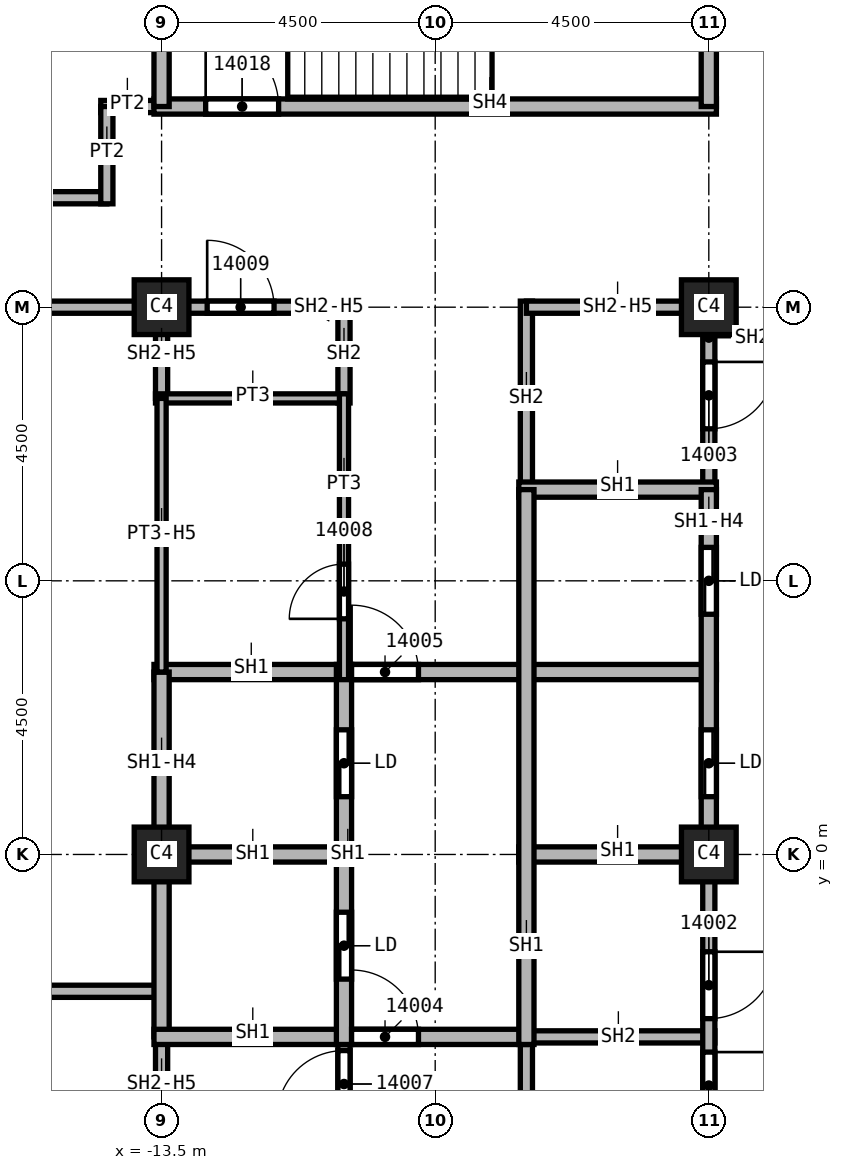
"""IFC4 building model, lengths in metres.
Left out: names, types, materials, properties, quantities, classifications, styles, units other than length and angle.
Written with IfcOpenShell. Run it as: python <this file> out.ifc"""

import sys

from ifc_helpers import new_model, si_unit, direction, frame, frame_2d, origin, origin_2d, place, context, subcontext, project, spatial, rectangle, extrude, element, fill, save


model = new_model("IFC4")
c1 = context("Model", 3, precision=1e-05, world=origin(), true_north=direction((0.0, 1.0)))
c2 = subcontext(c1, "Body", "Model", "MODEL_VIEW")
j1 = project(units=[si_unit("LENGTHUNIT", "METRE"), si_unit("PLANEANGLEUNIT", "RADIAN")], contexts=[c1])
p1 = place(None, origin())
s1 = spatial("IfcSite", under=j1, at=p1, CompositionType="ELEMENT")
p2 = place(p1, origin())
s2 = spatial("IfcBuilding", under=s1, at=p2, CompositionType="ELEMENT")
p3 = place(p2, frame((0.0, 0.0, 220.0)))
s3 = spatial("IfcBuildingStorey", under=s2, at=p3, CompositionType="ELEMENT", Elevation=220.0)
for number, where, z_axis, x_axis in (
    (1, (-4.5, 0.0, 0.0), (0.0, 0.0, 1.0), (1.0, 0.0, 0.0)),
    (2, (-4.5, 9.0, 0.0), (0.0, 0.0, 1.0), (1.0, 0.0, 0.0)),
    (3, (-13.5, 0.0, 0.0), (0.0, 0.0, 1.0), (1.0, 0.0, 0.0)),
    (4, (-13.5, 9.0, 0.0), (0.0, 0.0, 1.0), (1.0, 0.0, 0.0)),
):
    element("IfcColumn", number, at=place(p3, frame(where, z_axis=z_axis, x_axis=x_axis)), inside=s3, PredefinedType="COLUMN", context=c2, shape_type="SweptSolid", body=[
        extrude(rectangle(XDim=0.9, YDim=0.9, at=origin_2d()), origin(), (0.0, 0.0, 1.0), 3.72),
    ])
p4 = place(p3, frame((-18.0, -2.25, 0.0), z_axis=(0.0, 0.0, 1.0), x_axis=(1.0, 0.0, 0.0)))
e5 = element("IfcWall", 5, at=p4, inside=s3, PredefinedType="PARTITIONING", context=c2, shape_type="SweptSolid", body=[
    extrude(rectangle(XDim=4.5, YDim=0.2, at=frame_2d((2.25, 0.0))), origin(), (0.0, 0.0, 1.0), 3.72),
])
p5 = place(p3, frame((-18.0, 10.8, 0.0), z_axis=(0.0, 0.0, 1.0), x_axis=(1.0, 0.0, 0.0)))
e6 = element("IfcWall", 6, at=p5, inside=s3, PredefinedType="PARTITIONING", context=c2, shape_type="SweptSolid", body=[
    extrude(rectangle(XDim=3.6, YDim=0.2, at=frame_2d((1.8, 0.0))), origin(), (0.0, 0.0, 1.0), 3.72),
])
p6 = place(p5, frame((0.25, 0.0, 0.0)))
e7 = element("IfcOpeningElement", 7, at=p6, cuts=e6, PredefinedType="OPENING", context=c2, shape_type="SweptSolid", body=[
    extrude(rectangle(XDim=1.0, YDim=2.1, at=frame_2d((0.5, 1.05))), frame((0.0, 0.1, 0.0), z_axis=(0.0, -1.0, 0.0), x_axis=(1.0, 0.0, 0.0)), (0.0, 0.0, 1.0), 0.2),
])
p7 = place(p3, frame((-14.5, 12.3, 0.0), z_axis=(0.0, 0.0, 1.0), x_axis=(1.0, 0.0, 0.0)))
e8 = element("IfcWall", 8, at=p7, inside=s3, PredefinedType="PARTITIONING", context=c2, shape_type="SweptSolid", body=[
    extrude(rectangle(XDim=1.125, YDim=0.2, at=frame_2d((0.562, 0.0))), origin(), (0.0, 0.0, 1.0), 3.72),
])
p8 = place(p3, frame((-13.5, 9.0, 0.0), z_axis=(0.0, 0.0, 1.0), x_axis=(-1.0, 0.0, 0.0)))
e9 = element("IfcWall", 9, at=p8, inside=s3, PredefinedType="PARTITIONING", context=c2, shape_type="SweptSolid", body=[
    extrude(rectangle(XDim=4.5, YDim=0.2, at=frame_2d((2.25, 0.0))), origin(), (0.0, 0.0, 1.0), 3.72),
])
p9 = place(p3, frame((-14.4, 10.7, 0.0), z_axis=(0.0, 0.0, 1.0), x_axis=(0.0, 1.0, 0.0)))
e10 = element("IfcWall", 10, at=p9, inside=s3, PredefinedType="PARTITIONING", context=c2, shape_type="SweptSolid", body=[
    extrude(rectangle(XDim=1.6, YDim=0.2, at=frame_2d((0.8, 0.0))), origin(), (0.0, 0.0, 1.0), 3.72),
])
p10 = place(p3, frame((-13.6, 9.0, 0.0), z_axis=(0.0, 0.0, 1.0), x_axis=(1.0, 0.0, 0.0)))
e11 = element("IfcWall", 11, at=p10, inside=s3, PredefinedType="SOLIDWALL", context=c2, shape_type="SweptSolid", body=[
    extrude(rectangle(XDim=3.1, YDim=0.2, at=frame_2d((1.55, 0.0))), origin(), (0.0, 0.0, 1.0), 2.958),
])
p11 = place(p10, frame((0.85, 0.0, 0.0)))
e12 = element("IfcOpeningElement", 12, at=p11, cuts=e11, PredefinedType="OPENING", context=c2, shape_type="SweptSolid", body=[
    extrude(rectangle(XDim=1.1, YDim=2.1, at=frame_2d((0.55, 1.05))), frame((0.0, 0.1, 0.0), z_axis=(0.0, -1.0, 0.0), x_axis=(1.0, 0.0, 0.0)), (0.0, 0.0, 1.0), 0.2),
])
p12 = place(p3, frame((-13.5, -4.5, 0.0), z_axis=(0.0, 0.0, 1.0), x_axis=(0.0, 1.0, 0.0)))
e13 = element("IfcWall", 13, at=p12, inside=s3, PredefinedType="SOLIDWALL", context=c2, shape_type="SweptSolid", body=[
    extrude(rectangle(XDim=1.5, YDim=0.2, at=frame_2d((0.75, 0.0))), origin(), (0.0, 0.0, 1.0), 2.958),
])
p13 = place(p3, frame((-13.5, 7.5, 0.0), z_axis=(0.0, 0.0, 1.0), x_axis=(0.0, 1.0, 0.0)))
e14 = element("IfcWall", 14, at=p13, inside=s3, PredefinedType="SOLIDWALL", context=c2, shape_type="SweptSolid", body=[
    extrude(rectangle(XDim=1.6, YDim=0.2, at=frame_2d((0.8, 0.0))), origin(), (0.0, 0.0, 1.0), 2.958),
])
p14 = place(p3, frame((-10.5, -4.575, 0.0), z_axis=(0.0, 0.0, 1.0), x_axis=(0.0, 1.0, 0.0)))
e15 = element("IfcWall", 15, at=p14, inside=s3, PredefinedType="SOLIDWALL", context=c2, shape_type="SweptSolid", body=[
    extrude(rectangle(XDim=1.7, YDim=0.2, at=frame_2d((0.85, 0.0))), origin(), (0.0, 0.0, 1.0), 3.72),
])
p15 = place(p14, frame((0.25, 0.0, 0.0)))
e16 = element("IfcOpeningElement", 16, at=p15, cuts=e15, PredefinedType="OPENING", context=c2, shape_type="SweptSolid", body=[
    extrude(rectangle(XDim=1.1, YDim=2.1, at=frame_2d((0.55, 1.05))), frame((0.0, 0.1, 0.0), z_axis=(0.0, -1.0, 0.0), x_axis=(1.0, 0.0, 0.0)), (0.0, 0.0, 1.0), 0.2),
])
p16 = place(p3, frame((-10.5, 7.425, 0.0), z_axis=(0.0, 0.0, 1.0), x_axis=(0.0, 1.0, 0.0)))
e17 = element("IfcWall", 17, at=p16, inside=s3, PredefinedType="SOLIDWALL", context=c2, shape_type="SweptSolid", body=[
    extrude(rectangle(XDim=1.675, YDim=0.2, at=frame_2d((0.837, 0.0))), origin(), (0.0, 0.0, 1.0), 3.72),
])
p17 = place(p3, frame((-7.625, -3.0, 0.0), z_axis=(0.0, 0.0, 1.0), x_axis=(1.0, 0.0, 0.0)))
e18 = element("IfcWall", 18, at=p17, inside=s3, PredefinedType="SOLIDWALL", context=c2, shape_type="SweptSolid", body=[
    extrude(rectangle(XDim=3.225, YDim=0.2, at=frame_2d((1.613, 0.0))), origin(), (0.0, 0.0, 1.0), 3.72),
])
p18 = place(p3, frame((-7.5, -9.1, 0.0), z_axis=(0.0, 0.0, 1.0), x_axis=(0.0, 1.0, 0.0)))
e19 = element("IfcWall", 19, at=p18, inside=s3, PredefinedType="SOLIDWALL", context=c2, shape_type="SweptSolid", body=[
    extrude(rectangle(XDim=6.225, YDim=0.2, at=frame_2d((3.113, 0.0))), origin(), (0.0, 0.0, 1.0), 3.72),
])
p19 = place(p3, frame((-7.5, 6.0, 0.0), z_axis=(0.0, 0.0, 1.0), x_axis=(0.0, 1.0, 0.0)))
e20 = element("IfcWall", 20, at=p19, inside=s3, PredefinedType="SOLIDWALL", context=c2, shape_type="SweptSolid", body=[
    extrude(rectangle(XDim=3.1, YDim=0.2, at=frame_2d((1.55, 0.0))), origin(), (0.0, 0.0, 1.0), 3.72),
])
p20 = place(p3, frame((-7.5, 9.0, 0.0), z_axis=(0.0, 0.0, 1.0), x_axis=(1.0, 0.0, 0.0)))
e21 = element("IfcWall", 21, at=p20, inside=s3, PredefinedType="SOLIDWALL", context=c2, shape_type="SweptSolid", body=[
    extrude(rectangle(XDim=3.0, YDim=0.2, at=frame_2d((1.5, 0.0))), origin(), (0.0, 0.0, 1.0), 2.958),
])
p21 = place(p3, frame((-4.5, 0.0, 0.0), z_axis=(0.0, 0.0, 1.0), x_axis=(0.0, -1.0, 0.0)))
e22 = element("IfcWall", 22, at=p21, inside=s3, PredefinedType="SOLIDWALL", context=c2, shape_type="SweptSolid", body=[
    extrude(rectangle(XDim=9.1, YDim=0.2, at=frame_2d((4.55, 0.0))), origin(), (0.0, 0.0, 1.0), 2.958),
])
p22 = place(p21, frame((3.25, 0.0, 0.0)))
e23 = element("IfcOpeningElement", 23, at=p22, cuts=e22, PredefinedType="OPENING", context=c2, shape_type="SweptSolid", body=[
    extrude(rectangle(XDim=1.1, YDim=2.1, at=frame_2d((0.55, 1.05))), frame((0.0, 0.1, 0.0), z_axis=(0.0, -1.0, 0.0), x_axis=(1.0, 0.0, 0.0)), (0.0, 0.0, 1.0), 0.2),
])
p23 = place(p21, frame((1.6, 0.0, 0.0)))
e24 = element("IfcOpeningElement", 24, at=p23, cuts=e22, PredefinedType="OPENING", context=c2, shape_type="SweptSolid", body=[
    extrude(rectangle(XDim=1.1, YDim=2.1, at=frame_2d((0.55, 1.05))), frame((0.0, 0.1, 0.0), z_axis=(0.0, -1.0, 0.0), x_axis=(1.0, 0.0, 0.0)), (0.0, 0.0, 1.0), 0.2),
])
p24 = place(p3, frame((-4.5, 9.1, 0.0), z_axis=(0.0, 0.0, 1.0), x_axis=(0.0, -1.0, 0.0)))
e25 = element("IfcWall", 25, at=p24, inside=s3, PredefinedType="SOLIDWALL", context=c2, shape_type="SweptSolid", body=[
    extrude(rectangle(XDim=3.1, YDim=0.2, at=frame_2d((1.55, 0.0))), origin(), (0.0, 0.0, 1.0), 2.958),
])
p25 = place(p24, frame((1.0, 0.0, 0.0)))
e26 = element("IfcOpeningElement", 26, at=p25, cuts=e25, PredefinedType="OPENING", context=c2, shape_type="SweptSolid", body=[
    extrude(rectangle(XDim=1.1, YDim=2.1, at=frame_2d((0.55, 1.05))), frame((0.0, 0.1, 0.0), z_axis=(0.0, -1.0, 0.0), x_axis=(1.0, 0.0, 0.0)), (0.0, 0.0, 1.0), 0.2),
])
p26 = place(p3, frame((-13.625, 0.0, 0.0), z_axis=(0.0, 0.0, 1.0), x_axis=(1.0, 0.0, 0.0)))
e27 = element("IfcWall", 27, at=p26, inside=s3, PredefinedType="SOLIDWALL", context=c2, shape_type="SweptSolid", body=[
    extrude(rectangle(XDim=3.125, YDim=0.25, at=frame_2d((1.562, 0.0))), origin(), (0.0, 0.0, 1.0), 3.72),
])
p27 = place(p3, frame((-13.625, 3.0, 0.0), z_axis=(0.0, 0.0, 1.0), x_axis=(1.0, 0.0, 0.0)))
e28 = element("IfcWall", 28, at=p27, inside=s3, PredefinedType="SOLIDWALL", context=c2, shape_type="SweptSolid", body=[
    extrude(rectangle(XDim=9.25, YDim=0.25, at=frame_2d((4.625, 0.0))), origin(), (0.0, 0.0, 1.0), 3.72),
])
p28 = place(p27, frame((3.25, 0.0, 0.0)))
e29 = element("IfcOpeningElement", 29, at=p28, cuts=e28, PredefinedType="OPENING", context=c2, shape_type="SweptSolid", body=[
    extrude(rectangle(XDim=1.1, YDim=2.1, at=frame_2d((0.55, 1.05))), frame((0.0, 0.125, 0.0), z_axis=(0.0, -1.0, 0.0), x_axis=(1.0, 0.0, 0.0)), (0.0, 0.0, 1.0), 0.25),
])
p29 = place(p3, frame((-13.5, -3.0, 0.0), z_axis=(0.0, 0.0, 1.0), x_axis=(0.0, 1.0, 0.0)))
e30 = element("IfcWall", 30, at=p29, inside=s3, PredefinedType="SOLIDWALL", context=c2, shape_type="SweptSolid", body=[
    extrude(rectangle(XDim=6.0, YDim=0.25, at=frame_2d((3.0, 0.0))), origin(), (0.0, 0.0, 1.0), 2.958),
])
p30 = place(p3, frame((-13.625, -3.0, 0.0), z_axis=(0.0, 0.0, 1.0), x_axis=(1.0, 0.0, 0.0)))
e31 = element("IfcWall", 31, at=p30, inside=s3, PredefinedType="SOLIDWALL", context=c2, shape_type="SweptSolid", body=[
    extrude(rectangle(XDim=6.125, YDim=0.25, at=frame_2d((3.062, 0.0))), origin(), (0.0, 0.0, 1.0), 3.72),
])
p31 = place(p30, frame((3.25, 0.0, 0.0)))
e32 = element("IfcOpeningElement", 32, at=p31, cuts=e31, PredefinedType="OPENING", context=c2, shape_type="SweptSolid", body=[
    extrude(rectangle(XDim=1.1, YDim=2.1, at=frame_2d((0.55, 1.05))), frame((0.0, 0.125, 0.0), z_axis=(0.0, -1.0, 0.0), x_axis=(1.0, 0.0, 0.0)), (0.0, 0.0, 1.0), 0.25),
])
p32 = place(p3, frame((-10.5, -3.125, 0.0), z_axis=(0.0, 0.0, 1.0), x_axis=(0.0, 1.0, 0.0)))
e33 = element("IfcWall", 33, at=p32, inside=s3, PredefinedType="SOLIDWALL", context=c2, shape_type="SweptSolid", body=[
    extrude(rectangle(XDim=6.25, YDim=0.25, at=frame_2d((3.125, 0.0))), origin(), (0.0, 0.0, 1.0), 3.72),
])
p33 = place(p32, frame((1.075, 0.0, 0.0)))
e34 = element("IfcOpeningElement", 34, at=p33, cuts=e33, PredefinedType="OPENING", context=c2, shape_type="SweptSolid", body=[
    extrude(rectangle(XDim=1.1, YDim=2.1, at=frame_2d((0.55, 1.05))), frame((0.0, 0.125, 0.0), z_axis=(0.0, -1.0, 0.0), x_axis=(1.0, 0.0, 0.0)), (0.0, 0.0, 1.0), 0.25),
])
p34 = place(p32, frame((4.075, 0.0, 0.0)))
e35 = element("IfcOpeningElement", 35, at=p34, cuts=e33, PredefinedType="OPENING", context=c2, shape_type="SweptSolid", body=[
    extrude(rectangle(XDim=1.1, YDim=2.1, at=frame_2d((0.55, 1.05))), frame((0.0, 0.125, 0.0), z_axis=(0.0, -1.0, 0.0), x_axis=(1.0, 0.0, 0.0)), (0.0, 0.0, 1.0), 0.25),
])
for number, where, z_axis, x_axis in (
    (36, (-7.625, 0.0, 0.0), (0.0, 0.0, 1.0), (1.0, 0.0, 0.0)),
    (37, (-7.625, 6.0, 0.0), (0.0, 0.0, 1.0), (1.0, 0.0, 0.0)),
):
    element("IfcWall", number, at=place(p3, frame(where, z_axis=z_axis, x_axis=x_axis)), inside=s3, PredefinedType="SOLIDWALL", context=c2, shape_type="SweptSolid", body=[
        extrude(rectangle(XDim=3.25, YDim=0.25, at=frame_2d((1.625, 0.0))), origin(), (0.0, 0.0, 1.0), 3.72),
    ])
p35 = place(p3, frame((-7.5, -3.125, 0.0), z_axis=(0.0, 0.0, 1.0), x_axis=(0.0, 1.0, 0.0)))
e38 = element("IfcWall", 38, at=p35, inside=s3, PredefinedType="SOLIDWALL", context=c2, shape_type="SweptSolid", body=[
    extrude(rectangle(XDim=9.125, YDim=0.25, at=frame_2d((4.562, 0.0))), origin(), (0.0, 0.0, 1.0), 3.72),
])
p36 = place(p3, frame((-4.5, 6.0, 0.0), z_axis=(0.0, 0.0, 1.0), x_axis=(0.0, -1.0, 0.0)))
e39 = element("IfcWall", 39, at=p36, inside=s3, PredefinedType="SOLIDWALL", context=c2, shape_type="SweptSolid", body=[
    extrude(rectangle(XDim=6.0, YDim=0.25, at=frame_2d((3.0, 0.0))), origin(), (0.0, 0.0, 1.0), 2.958),
])
p37 = place(p36, frame((3.95, 0.0, 0.0)))
e40 = element("IfcOpeningElement", 40, at=p37, cuts=e39, PredefinedType="OPENING", context=c2, shape_type="SweptSolid", body=[
    extrude(rectangle(XDim=1.1, YDim=2.1, at=frame_2d((0.55, 1.05))), frame((0.0, 0.125, 0.0), z_axis=(0.0, -1.0, 0.0), x_axis=(1.0, 0.0, 0.0)), (0.0, 0.0, 1.0), 0.25),
])
p38 = place(p36, frame((0.95, 0.0, 0.0)))
e41 = element("IfcOpeningElement", 41, at=p38, cuts=e39, PredefinedType="OPENING", context=c2, shape_type="SweptSolid", body=[
    extrude(rectangle(XDim=1.1, YDim=2.1, at=frame_2d((0.55, 1.05))), frame((0.0, 0.125, 0.0), z_axis=(0.0, -1.0, 0.0), x_axis=(1.0, 0.0, 0.0)), (0.0, 0.0, 1.0), 0.25),
])
p39 = place(p3, frame((-13.625, 12.3, 0.0), z_axis=(0.0, 0.0, 1.0), x_axis=(1.0, 0.0, 0.0)))
e42 = element("IfcWall", 42, at=p39, inside=s3, PredefinedType="SOLIDWALL", context=c2, shape_type="SweptSolid", body=[
    extrude(rectangle(XDim=9.25, YDim=0.25, at=frame_2d((4.625, 0.0))), origin(), (0.0, 0.0, 1.0), 3.72),
])
p40 = place(p39, frame((0.85, 0.0, 0.0)))
e43 = element("IfcOpeningElement", 43, at=p40, cuts=e42, PredefinedType="OPENING", context=c2, shape_type="SweptSolid", body=[
    extrude(rectangle(XDim=1.2, YDim=2.1, at=frame_2d((0.6, 1.05))), frame((0.0, 0.125, 0.0), z_axis=(0.0, -1.0, 0.0), x_axis=(1.0, 0.0, 0.0)), (0.0, 0.0, 1.0), 0.25),
])
for number, where, z_axis, x_axis in (
    (44, (-13.5, 12.3, 0.0), (0.0, 0.0, 1.0), (0.0, 1.0, 0.0)),
    (45, (-4.5, 16.8, 0.0), (0.0, 0.0, 1.0), (0.0, -1.0, 0.0)),
):
    element("IfcWall", number, at=place(p3, frame(where, z_axis=z_axis, x_axis=x_axis)), inside=s3, PredefinedType="SOLIDWALL", context=c2, shape_type="SweptSolid", body=[
        extrude(rectangle(XDim=4.5, YDim=0.25, at=frame_2d((2.25, 0.0))), origin(), (0.0, 0.0, 1.0), 3.72),
    ])
p41 = place(p3, frame((-13.6, 7.5, 0.0), z_axis=(0.0, 0.0, 1.0), x_axis=(1.0, 0.0, 0.0)))
e46 = element("IfcWall", 46, at=p41, inside=s3, PredefinedType="PARTITIONING", context=c2, shape_type="SweptSolid", body=[
    extrude(rectangle(XDim=3.1, YDim=0.15, at=frame_2d((1.55, 0.0))), origin(), (0.0, 0.0, 1.0), 3.72),
])
p42 = place(p3, frame((-13.5, 3.0, 0.0), z_axis=(0.0, 0.0, 1.0), x_axis=(0.0, 1.0, 0.0)))
e47 = element("IfcWall", 47, at=p42, inside=s3, PredefinedType="PARTITIONING", context=c2, shape_type="SweptSolid", body=[
    extrude(rectangle(XDim=4.5, YDim=0.15, at=frame_2d((2.25, 0.0))), origin(), (0.0, 0.0, 1.0), 2.958),
])
p43 = place(p3, frame((-10.5, 2.875, 0.0), z_axis=(0.0, 0.0, 1.0), x_axis=(0.0, 1.0, 0.0)))
e48 = element("IfcWall", 48, at=p43, inside=s3, PredefinedType="PARTITIONING", context=c2, shape_type="SweptSolid", body=[
    extrude(rectangle(XDim=4.7, YDim=0.15, at=frame_2d((2.35, 0.0))), origin(), (0.0, 0.0, 1.0), 3.72),
])
p44 = place(p43, frame((1.0, 0.0, 0.0)))
e49 = element("IfcOpeningElement", 49, at=p44, cuts=e48, PredefinedType="OPENING", context=c2, shape_type="SweptSolid", body=[
    extrude(rectangle(XDim=0.9, YDim=2.1, at=frame_2d((0.45, 1.05))), frame((0.0, 0.075, 0.0), z_axis=(0.0, -1.0, 0.0), x_axis=(1.0, 0.0, 0.0)), (0.0, 0.0, 1.0), 0.15),
])
p45 = place(p22, origin())
e50 = element("IfcDoor", 50, at=p45, inside=s3, OperationType="SINGLE_SWING_RIGHT", PredefinedType="DOOR", context=c2, shape_type="SweptSolid", body=[
    extrude(rectangle(XDim=1.1, YDim=2.1, at=frame_2d((0.55, 1.05))), frame((0.0, 0.025, 0.0), z_axis=(0.0, -1.0, 0.0), x_axis=(1.0, 0.0, 0.0)), (0.0, 0.0, 1.0), 0.05),
])
fill(e23, e50)
p46 = place(p23, origin())
e51 = element("IfcDoor", 51, at=p46, inside=s3, OperationType="SINGLE_SWING_LEFT", PredefinedType="DOOR", context=c2, shape_type="SweptSolid", body=[
    extrude(rectangle(XDim=1.1, YDim=2.1, at=frame_2d((0.55, 1.05))), frame((0.0, 0.025, 0.0), z_axis=(0.0, -1.0, 0.0), x_axis=(1.0, 0.0, 0.0)), (0.0, 0.0, 1.0), 0.05),
])
fill(e24, e51)
p47 = place(p25, origin())
e52 = element("IfcDoor", 52, at=p47, inside=s3, OperationType="SINGLE_SWING_RIGHT", PredefinedType="DOOR", context=c2, shape_type="SweptSolid", body=[
    extrude(rectangle(XDim=1.1, YDim=2.1, at=frame_2d((0.55, 1.05))), frame((0.0, 0.025, 0.0), z_axis=(0.0, -1.0, 0.0), x_axis=(1.0, 0.0, 0.0)), (0.0, 0.0, 1.0), 0.05),
])
fill(e26, e52)
p48 = place(p31, origin())
e53 = element("IfcDoor", 53, at=p48, inside=s3, OperationType="SINGLE_SWING_LEFT", PredefinedType="DOOR", context=c2, shape_type="SweptSolid", body=[
    extrude(rectangle(XDim=1.1, YDim=2.1, at=frame_2d((0.55, 1.05))), frame((0.0, 0.025, 0.0), z_axis=(0.0, -1.0, 0.0), x_axis=(1.0, 0.0, 0.0)), (0.0, 0.0, 1.0), 0.05),
])
fill(e32, e53)
p49 = place(p28, origin())
e54 = element("IfcDoor", 54, at=p49, inside=s3, OperationType="SINGLE_SWING_RIGHT", PredefinedType="DOOR", context=c2, shape_type="SweptSolid", body=[
    extrude(rectangle(XDim=1.1, YDim=2.1, at=frame_2d((0.55, 1.05))), frame((0.0, 0.025, 0.0), z_axis=(0.0, -1.0, 0.0), x_axis=(1.0, 0.0, 0.0)), (0.0, 0.0, 1.0), 0.05),
])
fill(e29, e54)
p50 = place(p15, origin())
e55 = element("IfcDoor", 55, at=p50, inside=s3, OperationType="SINGLE_SWING_RIGHT", PredefinedType="DOOR", context=c2, shape_type="SweptSolid", body=[
    extrude(rectangle(XDim=1.1, YDim=2.1, at=frame_2d((0.55, 1.05))), frame((0.0, 0.025, 0.0), z_axis=(0.0, -1.0, 0.0), x_axis=(1.0, 0.0, 0.0)), (0.0, 0.0, 1.0), 0.05),
])
fill(e16, e55)
p51 = place(p44, origin())
e56 = element("IfcDoor", 56, at=p51, inside=s3, OperationType="SINGLE_SWING_LEFT", PredefinedType="DOOR", context=c2, shape_type="SweptSolid", body=[
    extrude(rectangle(XDim=0.9, YDim=2.1, at=frame_2d((0.45, 1.05))), frame((0.0, 0.025, 0.0), z_axis=(0.0, -1.0, 0.0), x_axis=(1.0, 0.0, 0.0)), (0.0, 0.0, 1.0), 0.05),
])
fill(e49, e56)
p52 = place(p11, origin())
e57 = element("IfcDoor", 57, at=p52, inside=s3, OperationType="SINGLE_SWING_RIGHT", PredefinedType="DOOR", context=c2, shape_type="SweptSolid", body=[
    extrude(rectangle(XDim=1.1, YDim=2.1, at=frame_2d((0.55, 1.05))), frame((0.0, 0.025, 0.0), z_axis=(0.0, -1.0, 0.0), x_axis=(1.0, 0.0, 0.0)), (0.0, 0.0, 1.0), 0.05),
])
fill(e12, e57)
p53 = place(p40, origin())
e58 = element("IfcDoor", 58, at=p53, inside=s3, OperationType="SINGLE_SWING_LEFT", PredefinedType="DOOR", context=c2, shape_type="SweptSolid", body=[
    extrude(rectangle(XDim=1.2, YDim=2.1, at=frame_2d((0.6, 1.05))), frame((0.0, 0.025, 0.0), z_axis=(0.0, -1.0, 0.0), x_axis=(1.0, 0.0, 0.0)), (0.0, 0.0, 1.0), 0.05),
])
fill(e43, e58)
p54 = place(p37, origin())
e59 = element("IfcDoor", 59, at=p54, inside=s3, OperationType="SLIDING_TO_LEFT", PredefinedType="DOOR", context=c2, shape_type="SweptSolid", body=[
    extrude(rectangle(XDim=1.1, YDim=2.1, at=frame_2d((0.55, 1.05))), frame((0.0, 0.025, 0.0), z_axis=(0.0, -1.0, 0.0), x_axis=(1.0, 0.0, 0.0)), (0.0, 0.0, 1.0), 0.05),
])
fill(e40, e59)
p55 = place(p38, origin())
e60 = element("IfcDoor", 60, at=p55, inside=s3, OperationType="SLIDING_TO_LEFT", PredefinedType="DOOR", context=c2, shape_type="SweptSolid", body=[
    extrude(rectangle(XDim=1.1, YDim=2.1, at=frame_2d((0.55, 1.05))), frame((0.0, 0.025, 0.0), z_axis=(0.0, -1.0, 0.0), x_axis=(1.0, 0.0, 0.0)), (0.0, 0.0, 1.0), 0.05),
])
fill(e41, e60)
p56 = place(p33, origin())
e61 = element("IfcDoor", 61, at=p56, inside=s3, OperationType="SLIDING_TO_LEFT", PredefinedType="DOOR", context=c2, shape_type="SweptSolid", body=[
    extrude(rectangle(XDim=1.1, YDim=2.1, at=frame_2d((0.55, 1.05))), frame((0.0, 0.025, 0.0), z_axis=(0.0, -1.0, 0.0), x_axis=(1.0, 0.0, 0.0)), (0.0, 0.0, 1.0), 0.05),
])
fill(e34, e61)
p57 = place(p34, origin())
e62 = element("IfcDoor", 62, at=p57, inside=s3, OperationType="SLIDING_TO_LEFT", PredefinedType="DOOR", context=c2, shape_type="SweptSolid", body=[
    extrude(rectangle(XDim=1.1, YDim=2.1, at=frame_2d((0.55, 1.05))), frame((0.0, 0.025, 0.0), z_axis=(0.0, -1.0, 0.0), x_axis=(1.0, 0.0, 0.0)), (0.0, 0.0, 1.0), 0.05),
])
fill(e35, e62)
save(model, sys.argv[1])
